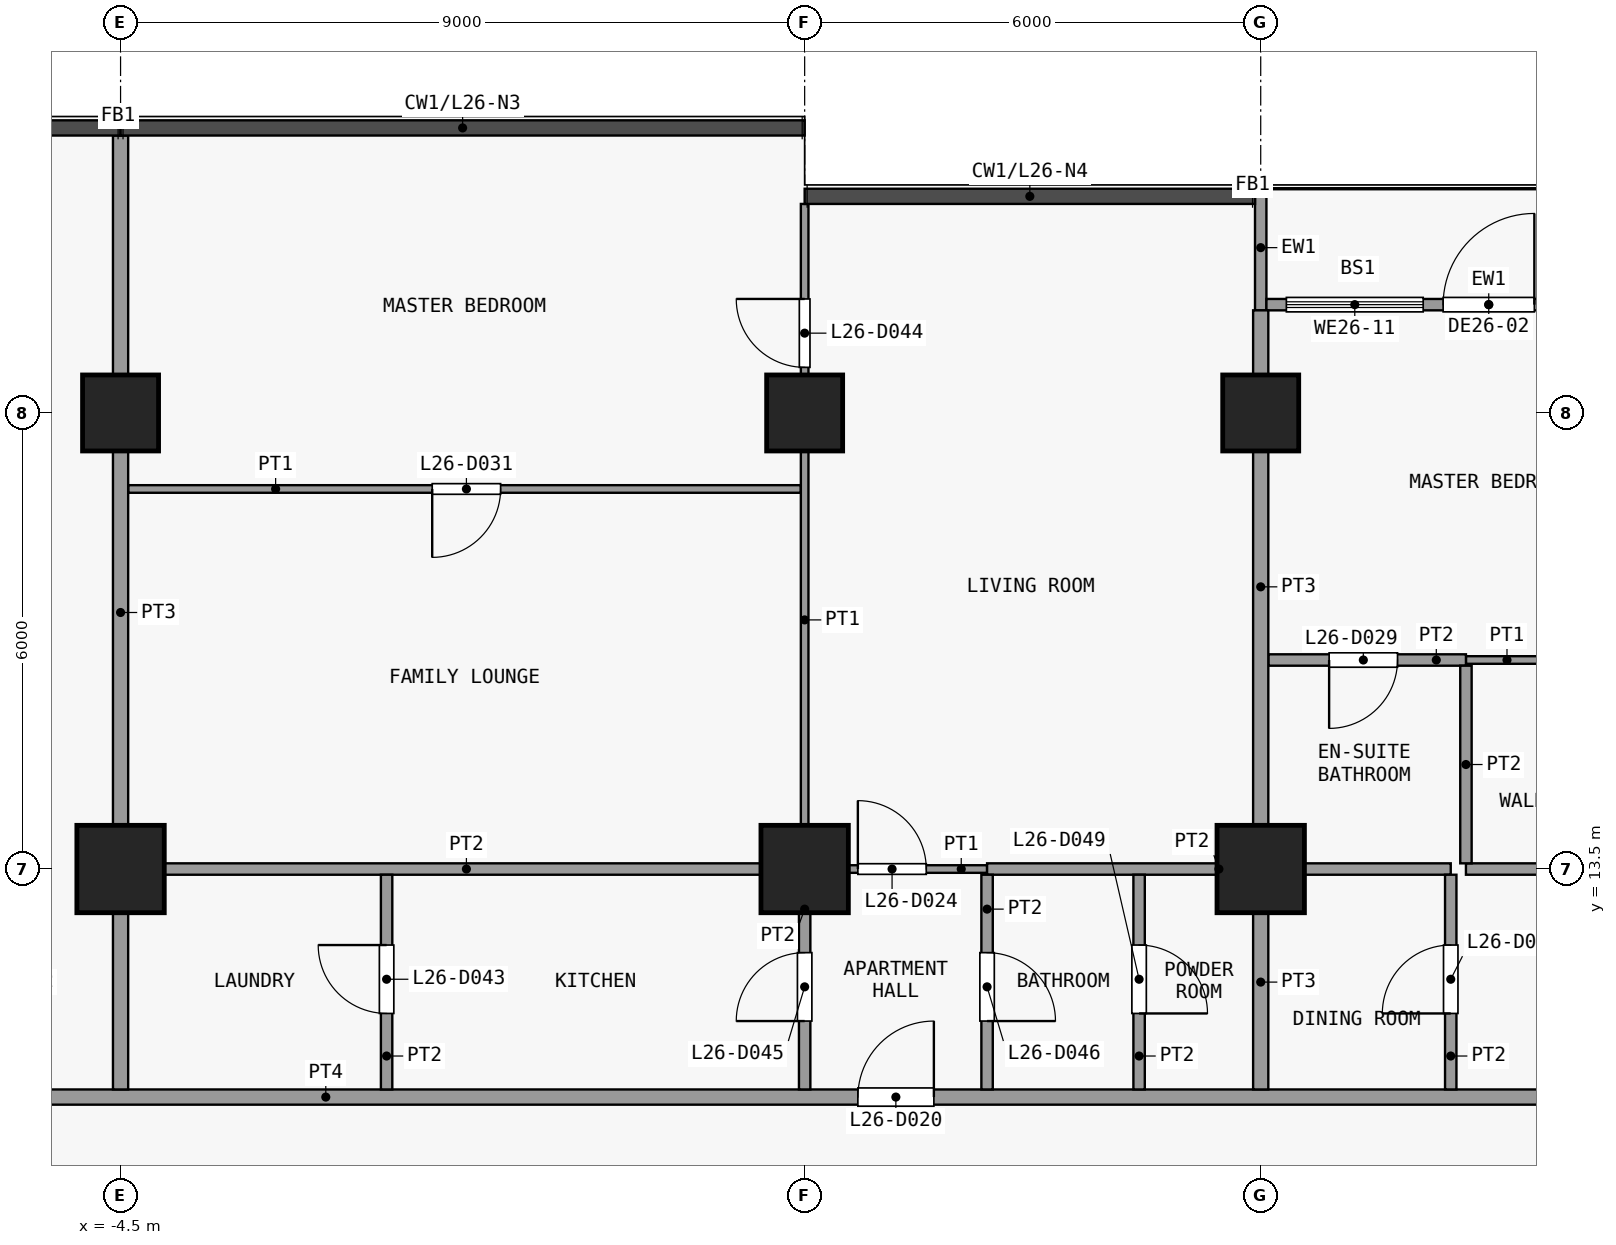
"""IFC4 building model, lengths in metres.
Left out: names, types, materials, properties, quantities, classifications, styles, units other than length and angle.
Written with IfcOpenShell. Run it as: python <this file> out.ifc"""

import sys

from ifc_helpers import new_model, si_unit, direction, frame, frame_2d, origin, origin_2d, place, context, subcontext, project, spatial, rectangle, extrude, element, fill, save


model = new_model("IFC4")
c1 = context("Model", 3, precision=1e-05, world=origin(), true_north=direction((0.0, 1.0)))
c2 = subcontext(c1, "Body", "Model", "MODEL_VIEW")
j1 = project(units=[si_unit("LENGTHUNIT", "METRE"), si_unit("PLANEANGLEUNIT", "RADIAN")], contexts=[c1])
p1 = place(None, origin())
s1 = spatial("IfcSite", under=j1, at=p1, CompositionType="ELEMENT")
p2 = place(p1, origin())
s2 = spatial("IfcBuilding", under=s1, at=p2, CompositionType="ELEMENT")
p3 = place(p2, frame((0.0, 0.0, 106.3)))
s3 = spatial("IfcBuildingStorey", under=s2, at=p3, CompositionType="ELEMENT", Elevation=106.3)
p4 = place(p3, frame((-4.5, 13.5, 0.0), z_axis=(0.0, 0.0, 1.0), x_axis=(1.0, 0.0, 0.0)))
e1 = element("IfcColumn", 1, at=p4, inside=s3, PredefinedType="COLUMN", context=c2, shape_type="SweptSolid", body=[
    extrude(rectangle(XDim=1.15, YDim=1.15, at=origin_2d()), origin(), (0.0, 0.0, 1.0), 3.6),
])
p5 = place(p3, frame((-4.5, 19.5, 0.0), z_axis=(0.0, 0.0, 1.0), x_axis=(1.0, 0.0, 0.0)))
e2 = element("IfcColumn", 2, at=p5, inside=s3, PredefinedType="COLUMN", context=c2, shape_type="SweptSolid", body=[
    extrude(rectangle(XDim=1.0, YDim=1.0, at=origin_2d()), origin(), (0.0, 0.0, 1.0), 3.6),
])
p6 = place(p3, frame((4.5, 13.5, 0.0), z_axis=(0.0, 0.0, 1.0), x_axis=(1.0, 0.0, 0.0)))
e3 = element("IfcColumn", 3, at=p6, inside=s3, PredefinedType="COLUMN", context=c2, shape_type="SweptSolid", body=[
    extrude(rectangle(XDim=1.15, YDim=1.15, at=origin_2d()), origin(), (0.0, 0.0, 1.0), 3.6),
])
p7 = place(p3, frame((4.5, 19.5, 0.0), z_axis=(0.0, 0.0, 1.0), x_axis=(1.0, 0.0, 0.0)))
e4 = element("IfcColumn", 4, at=p7, inside=s3, PredefinedType="COLUMN", context=c2, shape_type="SweptSolid", body=[
    extrude(rectangle(XDim=1.0, YDim=1.0, at=origin_2d()), origin(), (0.0, 0.0, 1.0), 3.6),
])
p8 = place(p3, frame((10.5, 13.5, 0.0), z_axis=(0.0, 0.0, 1.0), x_axis=(1.0, 0.0, 0.0)))
e5 = element("IfcColumn", 5, at=p8, inside=s3, PredefinedType="COLUMN", context=c2, shape_type="SweptSolid", body=[
    extrude(rectangle(XDim=1.15, YDim=1.15, at=origin_2d()), origin(), (0.0, 0.0, 1.0), 3.6),
])
p9 = place(p3, frame((10.5, 19.5, 0.0), z_axis=(0.0, 0.0, 1.0), x_axis=(1.0, 0.0, 0.0)))
e6 = element("IfcColumn", 6, at=p9, inside=s3, PredefinedType="COLUMN", context=c2, shape_type="SweptSolid", body=[
    extrude(rectangle(XDim=1.0, YDim=1.0, at=origin_2d()), origin(), (0.0, 0.0, 1.0), 3.6),
])
p10 = place(p3, frame((10.5, 20.85, 0.0), z_axis=(0.0, 0.0, 1.0), x_axis=(0.0, 1.0, 0.0)))
e7 = element("IfcWall", 7, at=p10, inside=s3, PredefinedType="SOLIDWALL", context=c2, shape_type="SweptSolid", body=[
    extrude(rectangle(XDim=1.65, YDim=0.15, at=frame_2d((0.825, 0.0))), origin(), (0.0, 0.0, 1.0), 3.3),
])
p11 = place(p3, frame((10.575, 20.925, 0.0), z_axis=(0.0, 0.0, 1.0), x_axis=(1.0, 0.0, 0.0)))
e8 = element("IfcWall", 8, at=p11, inside=s3, PredefinedType="SOLIDWALL", context=c2, shape_type="SweptSolid", body=[
    extrude(rectangle(XDim=5.85, YDim=0.15, at=frame_2d((2.925, 0.0))), origin(), (0.0, 0.0, 1.0), 3.3),
])
p12 = place(p11, frame((2.325, 0.0, 0.0)))
e9 = element("IfcOpeningElement", 9, at=p12, cuts=e8, PredefinedType="OPENING", context=c2, shape_type="SweptSolid", body=[
    extrude(rectangle(XDim=1.2, YDim=2.4, at=frame_2d((0.6, 1.2))), frame((0.0, 0.085, 0.0), z_axis=(0.0, -1.0, 0.0), x_axis=(1.0, 0.0, 0.0)), (0.0, 0.0, 1.0), 0.17),
])
p13 = place(p11, frame((0.262, 0.0, 0.9)))
e10 = element("IfcOpeningElement", 10, at=p13, cuts=e8, PredefinedType="OPENING", context=c2, shape_type="SweptSolid", body=[
    extrude(rectangle(XDim=1.8, YDim=2.1, at=frame_2d((0.9, 1.05))), frame((0.0, 0.085, 0.0), z_axis=(0.0, -1.0, 0.0), x_axis=(1.0, 0.0, 0.0)), (0.0, 0.0, 1.0), 0.17),
])
p14 = place(p11, frame((3.788, 0.0, 0.9)))
e11 = element("IfcOpeningElement", 11, at=p14, cuts=e8, PredefinedType="OPENING", context=c2, shape_type="SweptSolid", body=[
    extrude(rectangle(XDim=1.8, YDim=2.1, at=frame_2d((0.9, 1.05))), frame((0.0, 0.085, 0.0), z_axis=(0.0, -1.0, 0.0), x_axis=(1.0, 0.0, 0.0)), (0.0, 0.0, 1.0), 0.17),
])
p15 = place(p3, frame((-23.85, 10.5, 0.0), z_axis=(0.0, 0.0, 1.0), x_axis=(1.0, 0.0, 0.0)))
e12 = element("IfcWall", 12, at=p15, inside=s3, PredefinedType="PARTITIONING", context=c2, shape_type="SweptSolid", body=[
    extrude(rectangle(XDim=50.1, YDim=0.2, at=frame_2d((25.05, 0.0))), origin(), (0.0, 0.0, 1.0), 3.3),
])
p16 = place(p15, frame((9.05, 0.0, 0.0)))
e13 = element("IfcOpeningElement", 13, at=p16, cuts=e12, PredefinedType="OPENING", context=c2, shape_type="SweptSolid", body=[
    extrude(rectangle(XDim=1.0, YDim=2.1, at=frame_2d((0.5, 1.05))), frame((0.0, 0.11, 0.0), z_axis=(0.0, -1.0, 0.0), x_axis=(1.0, 0.0, 0.0)), (0.0, 0.0, 1.0), 0.22),
])
p17 = place(p15, frame((14.05, 0.0, 0.0)))
e14 = element("IfcOpeningElement", 14, at=p17, cuts=e12, PredefinedType="OPENING", context=c2, shape_type="SweptSolid", body=[
    extrude(rectangle(XDim=1.0, YDim=2.1, at=frame_2d((0.5, 1.05))), frame((0.0, 0.11, 0.0), z_axis=(0.0, -1.0, 0.0), x_axis=(1.0, 0.0, 0.0)), (0.0, 0.0, 1.0), 0.22),
])
p18 = place(p15, frame((29.05, 0.0, 0.0)))
e15 = element("IfcOpeningElement", 15, at=p18, cuts=e12, PredefinedType="OPENING", context=c2, shape_type="SweptSolid", body=[
    extrude(rectangle(XDim=1.0, YDim=2.1, at=frame_2d((0.5, 1.05))), frame((0.0, 0.11, 0.0), z_axis=(0.0, -1.0, 0.0), x_axis=(1.0, 0.0, 0.0)), (0.0, 0.0, 1.0), 0.22),
])
p19 = place(p15, frame((41.05, 0.0, 0.0)))
e16 = element("IfcOpeningElement", 16, at=p19, cuts=e12, PredefinedType="OPENING", context=c2, shape_type="SweptSolid", body=[
    extrude(rectangle(XDim=1.0, YDim=2.1, at=frame_2d((0.5, 1.05))), frame((0.0, 0.11, 0.0), z_axis=(0.0, -1.0, 0.0), x_axis=(1.0, 0.0, 0.0)), (0.0, 0.0, 1.0), 0.22),
])
p20 = place(p3, frame((4.5, 13.5, 0.0), z_axis=(0.0, 0.0, 1.0), x_axis=(1.0, 0.0, 0.0)))
e17 = element("IfcWall", 17, at=p20, inside=s3, PredefinedType="PARTITIONING", context=c2, shape_type="SweptSolid", body=[
    extrude(rectangle(XDim=2.4, YDim=0.1, at=frame_2d((1.2, 0.0))), origin(), (0.0, 0.0, 1.0), 3.3),
])
p21 = place(p20, frame((0.7, 0.0, 0.0)))
e18 = element("IfcOpeningElement", 18, at=p21, cuts=e17, PredefinedType="OPENING", context=c2, shape_type="SweptSolid", body=[
    extrude(rectangle(XDim=0.9, YDim=2.1, at=frame_2d((0.45, 1.05))), frame((0.0, 0.06, 0.0), z_axis=(0.0, -1.0, 0.0), x_axis=(1.0, 0.0, 0.0)), (0.0, 0.0, 1.0), 0.12),
])
p22 = place(p3, frame((-4.4, 13.5, 0.0), z_axis=(0.0, 0.0, 1.0), x_axis=(1.0, 0.0, 0.0)))
e19 = element("IfcWall", 19, at=p22, inside=s3, PredefinedType="PARTITIONING", context=c2, shape_type="SweptSolid", body=[
    extrude(rectangle(XDim=8.9, YDim=0.15, at=frame_2d((4.45, 0.0))), origin(), (0.0, 0.0, 1.0), 3.3),
])
p23 = place(p3, frame((6.9, 13.5, 0.0), z_axis=(0.0, 0.0, 1.0), x_axis=(1.0, 0.0, 0.0)))
e20 = element("IfcWall", 20, at=p23, inside=s3, PredefinedType="PARTITIONING", context=c2, shape_type="SweptSolid", body=[
    extrude(rectangle(XDim=6.1, YDim=0.15, at=frame_2d((3.05, 0.0))), origin(), (0.0, 0.0, 1.0), 3.3),
])
p24 = place(p3, frame((13.2, 13.5, 0.0), z_axis=(0.0, 0.0, 1.0), x_axis=(1.0, 0.0, 0.0)))
e21 = element("IfcWall", 21, at=p24, inside=s3, PredefinedType="PARTITIONING", context=c2, shape_type="SweptSolid", body=[
    extrude(rectangle(XDim=3.3, YDim=0.15, at=frame_2d((1.65, 0.0))), origin(), (0.0, 0.0, 1.0), 3.3),
])
p25 = place(p3, frame((13.2, 16.25, 0.0), z_axis=(0.0, 0.0, 1.0), x_axis=(1.0, 0.0, 0.0)))
e22 = element("IfcWall", 22, at=p25, inside=s3, PredefinedType="PARTITIONING", context=c2, shape_type="SweptSolid", body=[
    extrude(rectangle(XDim=3.25, YDim=0.1, at=frame_2d((1.625, 0.0))), origin(), (0.0, 0.0, 1.0), 3.3),
])
p26 = place(p25, frame((1.2, 0.0, 0.0)))
e23 = element("IfcOpeningElement", 23, at=p26, cuts=e22, PredefinedType="OPENING", context=c2, shape_type="SweptSolid", body=[
    extrude(rectangle(XDim=0.9, YDim=2.1, at=frame_2d((0.45, 1.05))), frame((0.0, 0.06, 0.0), z_axis=(0.0, -1.0, 0.0), x_axis=(1.0, 0.0, 0.0)), (0.0, 0.0, 1.0), 0.12),
])
p27 = place(p3, frame((10.6, 16.25, 0.0), z_axis=(0.0, 0.0, 1.0), x_axis=(1.0, 0.0, 0.0)))
e24 = element("IfcWall", 24, at=p27, inside=s3, PredefinedType="PARTITIONING", context=c2, shape_type="SweptSolid", body=[
    extrude(rectangle(XDim=2.6, YDim=0.15, at=frame_2d((1.3, 0.0))), origin(), (0.0, 0.0, 1.0), 3.3),
])
p28 = place(p27, frame((0.8, 0.0, 0.0)))
e25 = element("IfcOpeningElement", 25, at=p28, cuts=e24, PredefinedType="OPENING", context=c2, shape_type="SweptSolid", body=[
    extrude(rectangle(XDim=0.9, YDim=2.1, at=frame_2d((0.45, 1.05))), frame((0.0, 0.085, 0.0), z_axis=(0.0, -1.0, 0.0), x_axis=(1.0, 0.0, 0.0)), (0.0, 0.0, 1.0), 0.17),
])
p29 = place(p3, frame((-4.4, 18.5, 0.0), z_axis=(0.0, 0.0, 1.0), x_axis=(1.0, 0.0, 0.0)))
e26 = element("IfcWall", 26, at=p29, inside=s3, PredefinedType="PARTITIONING", context=c2, shape_type="SweptSolid", body=[
    extrude(rectangle(XDim=8.85, YDim=0.1, at=frame_2d((4.425, 0.0))), origin(), (0.0, 0.0, 1.0), 3.3),
])
p30 = place(p29, frame((4.0, 0.0, 0.0)))
e27 = element("IfcOpeningElement", 27, at=p30, cuts=e26, PredefinedType="OPENING", context=c2, shape_type="SweptSolid", body=[
    extrude(rectangle(XDim=0.9, YDim=2.1, at=frame_2d((0.45, 1.05))), frame((0.0, 0.06, 0.0), z_axis=(0.0, -1.0, 0.0), x_axis=(1.0, 0.0, 0.0)), (0.0, 0.0, 1.0), 0.12),
])
p31 = place(p3, frame((-4.5, 10.6, 0.0), z_axis=(0.0, 0.0, 1.0), x_axis=(0.0, 1.0, 0.0)))
e28 = element("IfcWall", 28, at=p31, inside=s3, PredefinedType="PARTITIONING", context=c2, shape_type="SweptSolid", body=[
    extrude(rectangle(XDim=12.55, YDim=0.2, at=frame_2d((6.275, 0.0))), origin(), (0.0, 0.0, 1.0), 3.3),
])
p32 = place(p3, frame((-1.0, 10.6, 0.0), z_axis=(0.0, 0.0, 1.0), x_axis=(0.0, 1.0, 0.0)))
e29 = element("IfcWall", 29, at=p32, inside=s3, PredefinedType="PARTITIONING", context=c2, shape_type="SweptSolid", body=[
    extrude(rectangle(XDim=2.825, YDim=0.15, at=frame_2d((1.413, 0.0))), origin(), (0.0, 0.0, 1.0), 3.3),
])
p33 = place(p32, frame((1.0, 0.0, 0.0)))
e30 = element("IfcOpeningElement", 30, at=p33, cuts=e29, PredefinedType="OPENING", context=c2, shape_type="SweptSolid", body=[
    extrude(rectangle(XDim=0.9, YDim=2.1, at=frame_2d((0.45, 1.05))), frame((0.0, 0.085, 0.0), z_axis=(0.0, -1.0, 0.0), x_axis=(1.0, 0.0, 0.0)), (0.0, 0.0, 1.0), 0.17),
])
p34 = place(p3, frame((4.5, 13.575, 0.0), z_axis=(0.0, 0.0, 1.0), x_axis=(0.0, 1.0, 0.0)))
e31 = element("IfcWall", 31, at=p34, inside=s3, PredefinedType="PARTITIONING", context=c2, shape_type="SweptSolid", body=[
    extrude(rectangle(XDim=8.675, YDim=0.1, at=frame_2d((4.337, 0.0))), origin(), (0.0, 0.0, 1.0), 3.3),
])
p35 = place(p34, frame((6.525, 0.0, 0.0)))
e32 = element("IfcOpeningElement", 32, at=p35, cuts=e31, PredefinedType="OPENING", context=c2, shape_type="SweptSolid", body=[
    extrude(rectangle(XDim=0.9, YDim=2.1, at=frame_2d((0.45, 1.05))), frame((0.0, 0.06, 0.0), z_axis=(0.0, -1.0, 0.0), x_axis=(1.0, 0.0, 0.0)), (0.0, 0.0, 1.0), 0.12),
])
p36 = place(p3, frame((4.5, 10.6, 0.0), z_axis=(0.0, 0.0, 1.0), x_axis=(0.0, 1.0, 0.0)))
e33 = element("IfcWall", 33, at=p36, inside=s3, PredefinedType="PARTITIONING", context=c2, shape_type="SweptSolid", body=[
    extrude(rectangle(XDim=2.825, YDim=0.15, at=frame_2d((1.413, 0.0))), origin(), (0.0, 0.0, 1.0), 3.3),
])
p37 = place(p36, frame((0.9, 0.0, 0.0)))
e34 = element("IfcOpeningElement", 34, at=p37, cuts=e33, PredefinedType="OPENING", context=c2, shape_type="SweptSolid", body=[
    extrude(rectangle(XDim=0.9, YDim=2.1, at=frame_2d((0.45, 1.05))), frame((0.0, 0.085, 0.0), z_axis=(0.0, -1.0, 0.0), x_axis=(1.0, 0.0, 0.0)), (0.0, 0.0, 1.0), 0.17),
])
p38 = place(p3, frame((6.9, 10.6, 0.0), z_axis=(0.0, 0.0, 1.0), x_axis=(0.0, 1.0, 0.0)))
e35 = element("IfcWall", 35, at=p38, inside=s3, PredefinedType="PARTITIONING", context=c2, shape_type="SweptSolid", body=[
    extrude(rectangle(XDim=2.825, YDim=0.15, at=frame_2d((1.413, 0.0))), origin(), (0.0, 0.0, 1.0), 3.3),
])
p39 = place(p38, frame((0.9, 0.0, 0.0)))
e36 = element("IfcOpeningElement", 36, at=p39, cuts=e35, PredefinedType="OPENING", context=c2, shape_type="SweptSolid", body=[
    extrude(rectangle(XDim=0.9, YDim=2.1, at=frame_2d((0.45, 1.05))), frame((0.0, 0.085, 0.0), z_axis=(0.0, -1.0, 0.0), x_axis=(1.0, 0.0, 0.0)), (0.0, 0.0, 1.0), 0.17),
])
p40 = place(p3, frame((8.9, 10.6, 0.0), z_axis=(0.0, 0.0, 1.0), x_axis=(0.0, 1.0, 0.0)))
e37 = element("IfcWall", 37, at=p40, inside=s3, PredefinedType="PARTITIONING", context=c2, shape_type="SweptSolid", body=[
    extrude(rectangle(XDim=2.825, YDim=0.15, at=frame_2d((1.413, 0.0))), origin(), (0.0, 0.0, 1.0), 3.3),
])
p41 = place(p40, frame((1.0, 0.0, 0.0)))
e38 = element("IfcOpeningElement", 38, at=p41, cuts=e37, PredefinedType="OPENING", context=c2, shape_type="SweptSolid", body=[
    extrude(rectangle(XDim=0.9, YDim=2.1, at=frame_2d((0.45, 1.05))), frame((0.0, 0.085, 0.0), z_axis=(0.0, -1.0, 0.0), x_axis=(1.0, 0.0, 0.0)), (0.0, 0.0, 1.0), 0.17),
])
p42 = place(p3, frame((10.5, 10.6, 0.0), z_axis=(0.0, 0.0, 1.0), x_axis=(0.0, 1.0, 0.0)))
e39 = element("IfcWall", 39, at=p42, inside=s3, PredefinedType="PARTITIONING", context=c2, shape_type="SweptSolid", body=[
    extrude(rectangle(XDim=2.825, YDim=0.2, at=frame_2d((1.413, 0.0))), origin(), (0.0, 0.0, 1.0), 3.3),
])
p43 = place(p3, frame((10.5, 13.575, 0.0), z_axis=(0.0, 0.0, 1.0), x_axis=(0.0, 1.0, 0.0)))
e40 = element("IfcWall", 40, at=p43, inside=s3, PredefinedType="PARTITIONING", context=c2, shape_type="SweptSolid", body=[
    extrude(rectangle(XDim=7.275, YDim=0.2, at=frame_2d((3.638, 0.0))), origin(), (0.0, 0.0, 1.0), 3.3),
])
p44 = place(p3, frame((13.0, 10.6, 0.0), z_axis=(0.0, 0.0, 1.0), x_axis=(0.0, 1.0, 0.0)))
e41 = element("IfcWall", 41, at=p44, inside=s3, PredefinedType="PARTITIONING", context=c2, shape_type="SweptSolid", body=[
    extrude(rectangle(XDim=2.825, YDim=0.15, at=frame_2d((1.413, 0.0))), origin(), (0.0, 0.0, 1.0), 3.3),
])
p45 = place(p44, frame((1.0, 0.0, 0.0)))
e42 = element("IfcOpeningElement", 42, at=p45, cuts=e41, PredefinedType="OPENING", context=c2, shape_type="SweptSolid", body=[
    extrude(rectangle(XDim=0.9, YDim=2.1, at=frame_2d((0.45, 1.05))), frame((0.0, 0.085, 0.0), z_axis=(0.0, -1.0, 0.0), x_axis=(1.0, 0.0, 0.0)), (0.0, 0.0, 1.0), 0.17),
])
p46 = place(p3, frame((13.2, 13.575, 0.0), z_axis=(0.0, 0.0, 1.0), x_axis=(0.0, 1.0, 0.0)))
e43 = element("IfcWall", 43, at=p46, inside=s3, PredefinedType="PARTITIONING", context=c2, shape_type="SweptSolid", body=[
    extrude(rectangle(XDim=2.6, YDim=0.15, at=frame_2d((1.3, 0.0))), origin(), (0.0, 0.0, 1.0), 3.3),
])
p47 = place(p12, origin())
e44 = element("IfcDoor", 44, at=p47, inside=s3, OperationType="SINGLE_SWING_RIGHT", PredefinedType="DOOR", context=c2, shape_type="SweptSolid", body=[
    extrude(rectangle(XDim=1.2, YDim=2.4, at=frame_2d((0.6, 1.2))), frame((0.0, 0.025, 0.0), z_axis=(0.0, -1.0, 0.0), x_axis=(1.0, 0.0, 0.0)), (0.0, 0.0, 1.0), 0.05),
])
fill(e9, e44)
p48 = place(p13, origin())
e45 = element("IfcWindow", 45, at=p48, inside=s3, PartitioningType="SINGLE_PANEL", PredefinedType="WINDOW", context=c2, shape_type="SweptSolid", body=[
    extrude(rectangle(XDim=1.8, YDim=2.1, at=frame_2d((0.9, 1.05))), frame((0.0, 0.03, 0.0), z_axis=(0.0, -1.0, 0.0), x_axis=(1.0, 0.0, 0.0)), (0.0, 0.0, 1.0), 0.06),
])
fill(e10, e45)
p49 = place(p18, origin())
e46 = element("IfcDoor", 46, at=p49, inside=s3, OperationType="SINGLE_SWING_LEFT", PredefinedType="DOOR", context=c2, shape_type="SweptSolid", body=[
    extrude(rectangle(XDim=1.0, YDim=2.1, at=frame_2d((0.5, 1.05))), frame((0.0, 0.025, 0.0), z_axis=(0.0, -1.0, 0.0), x_axis=(1.0, 0.0, 0.0)), (0.0, 0.0, 1.0), 0.05),
])
fill(e15, e46)
p50 = place(p21, origin())
e47 = element("IfcDoor", 47, at=p50, inside=s3, OperationType="SINGLE_SWING_RIGHT", PredefinedType="DOOR", context=c2, shape_type="SweptSolid", body=[
    extrude(rectangle(XDim=0.9, YDim=2.1, at=frame_2d((0.45, 1.05))), frame((0.0, 0.025, 0.0), z_axis=(0.0, -1.0, 0.0), x_axis=(1.0, 0.0, 0.0)), (0.0, 0.0, 1.0), 0.05),
])
fill(e18, e47)
p51 = place(p28, origin())
e48 = element("IfcDoor", 48, at=p51, inside=s3, OperationType="SINGLE_SWING_LEFT", PredefinedType="DOOR", context=c2, shape_type="SweptSolid", body=[
    extrude(rectangle(XDim=0.9, YDim=2.1, at=frame_2d((0.45, 1.05))), frame((0.0, 0.025, 0.0), z_axis=(0.0, -1.0, 0.0), x_axis=(1.0, 0.0, 0.0)), (0.0, 0.0, 1.0), 0.05),
])
fill(e25, e48)
p52 = place(p30, origin())
e49 = element("IfcDoor", 49, at=p52, inside=s3, OperationType="SINGLE_SWING_LEFT", PredefinedType="DOOR", context=c2, shape_type="SweptSolid", body=[
    extrude(rectangle(XDim=0.9, YDim=2.1, at=frame_2d((0.45, 1.05))), frame((0.0, 0.025, 0.0), z_axis=(0.0, -1.0, 0.0), x_axis=(1.0, 0.0, 0.0)), (0.0, 0.0, 1.0), 0.05),
])
fill(e27, e49)
p53 = place(p33, origin())
e50 = element("IfcDoor", 50, at=p53, inside=s3, OperationType="SINGLE_SWING_LEFT", PredefinedType="DOOR", context=c2, shape_type="SweptSolid", body=[
    extrude(rectangle(XDim=0.9, YDim=2.1, at=frame_2d((0.45, 1.05))), frame((0.0, 0.025, 0.0), z_axis=(0.0, -1.0, 0.0), x_axis=(1.0, 0.0, 0.0)), (0.0, 0.0, 1.0), 0.05),
])
fill(e30, e50)
p54 = place(p35, origin())
e51 = element("IfcDoor", 51, at=p54, inside=s3, OperationType="SINGLE_SWING_LEFT", PredefinedType="DOOR", context=c2, shape_type="SweptSolid", body=[
    extrude(rectangle(XDim=0.9, YDim=2.1, at=frame_2d((0.45, 1.05))), frame((0.0, 0.025, 0.0), z_axis=(0.0, -1.0, 0.0), x_axis=(1.0, 0.0, 0.0)), (0.0, 0.0, 1.0), 0.05),
])
fill(e32, e51)
p55 = place(p37, origin())
e52 = element("IfcDoor", 52, at=p55, inside=s3, OperationType="SINGLE_SWING_RIGHT", PredefinedType="DOOR", context=c2, shape_type="SweptSolid", body=[
    extrude(rectangle(XDim=0.9, YDim=2.1, at=frame_2d((0.45, 1.05))), frame((0.0, 0.025, 0.0), z_axis=(0.0, -1.0, 0.0), x_axis=(1.0, 0.0, 0.0)), (0.0, 0.0, 1.0), 0.05),
])
fill(e34, e52)
p56 = place(p39, origin())
e53 = element("IfcDoor", 53, at=p56, inside=s3, OperationType="SINGLE_SWING_LEFT", PredefinedType="DOOR", context=c2, shape_type="SweptSolid", body=[
    extrude(rectangle(XDim=0.9, YDim=2.1, at=frame_2d((0.45, 1.05))), frame((0.0, 0.025, 0.0), z_axis=(0.0, -1.0, 0.0), x_axis=(1.0, 0.0, 0.0)), (0.0, 0.0, 1.0), 0.05),
])
fill(e36, e53)
p57 = place(p41, origin())
e54 = element("IfcDoor", 54, at=p57, inside=s3, OperationType="SINGLE_SWING_LEFT", PredefinedType="DOOR", context=c2, shape_type="SweptSolid", body=[
    extrude(rectangle(XDim=0.9, YDim=2.1, at=frame_2d((0.45, 1.05))), frame((0.0, 0.025, 0.0), z_axis=(0.0, -1.0, 0.0), x_axis=(1.0, 0.0, 0.0)), (0.0, 0.0, 1.0), 0.05),
])
fill(e38, e54)
p58 = place(p45, origin())
e55 = element("IfcDoor", 55, at=p58, inside=s3, OperationType="SINGLE_SWING_RIGHT", PredefinedType="DOOR", context=c2, shape_type="SweptSolid", body=[
    extrude(rectangle(XDim=0.9, YDim=2.1, at=frame_2d((0.45, 1.05))), frame((0.0, 0.025, 0.0), z_axis=(0.0, -1.0, 0.0), x_axis=(1.0, 0.0, 0.0)), (0.0, 0.0, 1.0), 0.05),
])
fill(e42, e55)
save(model, sys.argv[1])
